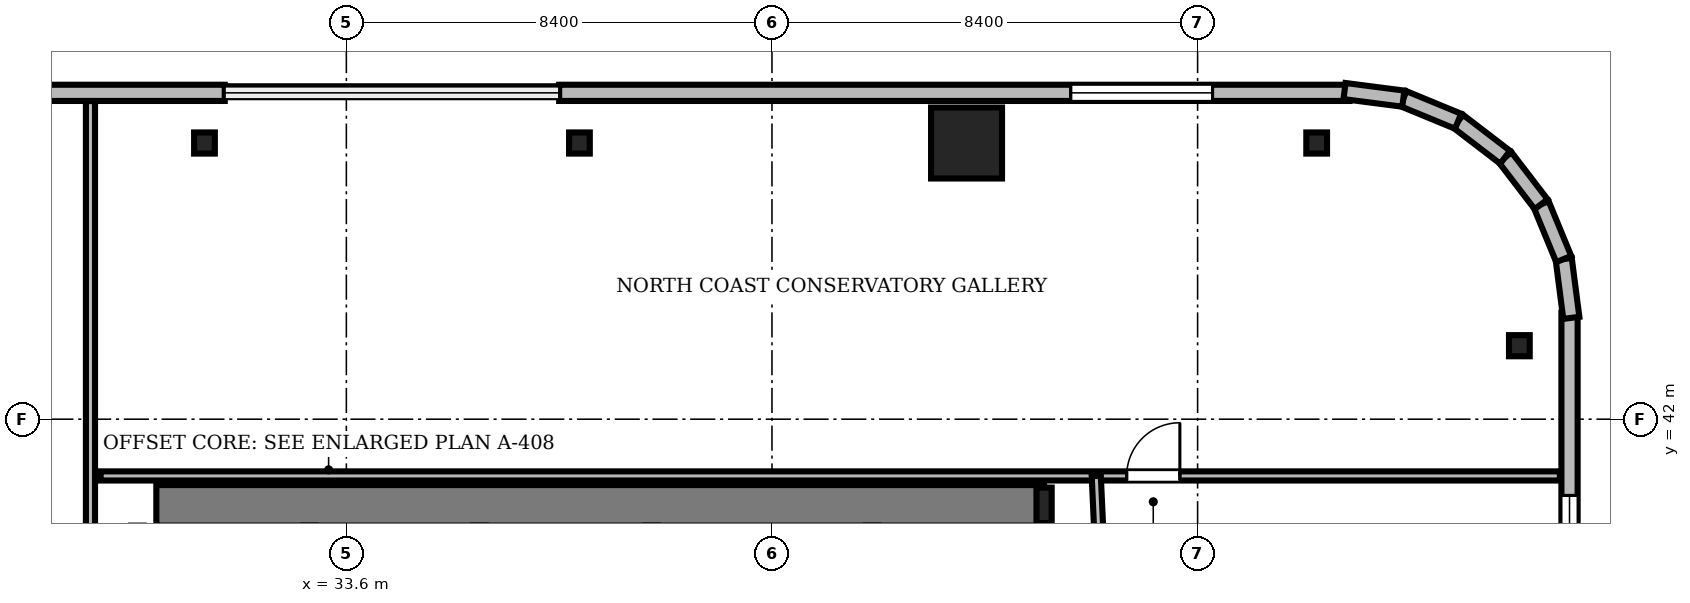
"""IFC4 building model, lengths in metres.
Left out: names, types, materials, properties, quantities, classifications, styles, units other than length and angle.
Written with IfcOpenShell. Run it as: python <this file> out.ifc"""

import sys

from ifc_helpers import new_model, si_unit, direction, frame, frame_2d, origin, origin_2d, place, context, subcontext, project, spatial, rectangle, i_section, extrude, source, transform, mapped, element, fill, save


model = new_model("IFC4")
c1 = context("Model", 3, precision=1e-05, world=origin(), true_north=direction((0.0, 1.0)))
c2 = subcontext(c1, "Body", "Model", "MODEL_VIEW")
j1 = project(units=[si_unit("LENGTHUNIT", "METRE"), si_unit("PLANEANGLEUNIT", "RADIAN")], contexts=[c1])
p1 = place(None, origin())
s1 = spatial("IfcSite", under=j1, at=p1, CompositionType="ELEMENT")
p2 = place(p1, origin())
s2 = spatial("IfcBuilding", under=s1, at=p2, CompositionType="ELEMENT")
p3 = place(p2, frame((0.0, 0.0, 172.2)))
s3 = spatial("IfcBuildingStorey", under=s2, at=p3, CompositionType="ELEMENT", Elevation=172.2)
m1 = source(origin(), c2, "Body", "SweptSolid", [
    extrude(rectangle(XDim=17.52, YDim=0.8, at=frame_2d((8.76, 0.0))), origin(), (0.0, 0.0, 1.0), 4.78),
])
p4 = place(p3, frame((29.85, 40.3, 0.0), z_axis=(0.0, 0.0, 1.0), x_axis=(1.0, 0.0, 0.0)))
e1 = element("IfcWall", 1, at=p4, inside=s3, PredefinedType="SHEAR", context=c2, shape_type="MappedRepresentation", body=[
    mapped(m1, transform((0.0, 0.0, 0.0), scale=1.0)),
])
m2 = source(origin(), c2, "Body", "SweptSolid", [
    extrude(i_section(OverallWidth=0.3, OverallDepth=0.7, WebThickness=0.017, FlangeThickness=0.032, FilletRadius=0.027, at=origin_2d()), origin(), (0.0, 0.0, 1.0), 4.78),
])
p5 = place(p3, frame((47.37, 40.3, 0.0), z_axis=(0.0, 0.0, 1.0), x_axis=(1.0, 0.0, 0.0)))
e2 = element("IfcColumn", 2, at=p5, inside=s3, PredefinedType="COLUMN", context=c2, shape_type="MappedRepresentation", body=[
    mapped(m2, transform((0.0, 0.0, 0.0), scale=1.0)),
])
m3 = source(origin(), c2, "Body", "SweptSolid", [
    extrude(rectangle(XDim=1.4, YDim=1.4, at=origin_2d()), origin(), (0.0, 0.0, 1.0), 4.78),
])
p6 = place(p3, frame((45.84, 47.45, 0.0), z_axis=(0.0, 0.0, 1.0), x_axis=(1.0, 0.0, 0.0)))
e3 = element("IfcColumn", 3, at=p6, inside=s3, PredefinedType="COLUMN", context=c2, shape_type="MappedRepresentation", body=[
    mapped(m3, transform((0.0, 0.0, 0.0), scale=1.0)),
])
m4 = source(origin(), c2, "Body", "SweptSolid", [
    extrude(i_section(OverallWidth=0.409, OverallDepth=0.417, WebThickness=0.021, FlangeThickness=0.033, FilletRadius=0.015, at=origin_2d()), origin(), (0.0, 0.0, 1.0), 4.78),
])
for number, where, z_axis, x_axis in (
    (4, (56.75, 43.45, 0.0), (0.0, 0.0, 1.0), (1.0, 0.0, 0.0)),
    (5, (52.75, 47.45, 0.0), (0.0, 0.0, 1.0), (1.0, 0.0, 0.0)),
    (6, (38.2, 47.45, 0.0), (0.0, 0.0, 1.0), (1.0, 0.0, 0.0)),
    (7, (30.8, 47.45, 0.0), (0.0, 0.0, 1.0), (1.0, 0.0, 0.0)),
):
    element("IfcColumn", number, at=place(p3, frame(where, z_axis=z_axis, x_axis=x_axis)), inside=s3, PredefinedType="COLUMN", context=c2, shape_type="MappedRepresentation", body=[
        mapped(m4, transform((0.0, 0.0, 0.0), scale=1.0)),
    ])
m5 = source(origin(), c2, "Body", "SweptSolid", [
    extrude(rectangle(XDim=15.6, YDim=0.32, at=frame_2d((7.8, 0.0))), origin(), (0.0, 0.0, 1.0), 4.78),
])
p7 = place(p3, frame((53.4, 48.44, 0.0), z_axis=(0.0, 0.0, 1.0), x_axis=(-1.0, 0.0, 0.0)))
e8 = element("IfcWall", 8, at=p7, inside=s3, PredefinedType="SOLIDWALL", context=c2, shape_type="MappedRepresentation", body=[
    mapped(m5, transform((0.0, 0.0, 0.0), scale=1.0)),
])
m6 = source(origin(), c2, "Body", "SweptSolid", [
    extrude(rectangle(XDim=2.8, YDim=2.4, at=frame_2d((1.4, 1.2))), frame((0.0, 0.17, 0.0), z_axis=(0.0, -1.0, 0.0), x_axis=(1.0, 0.0, 0.0)), (0.0, 0.0, 1.0), 0.34),
])
p8 = place(p7, frame((2.705, 0.0, 0.72)))
e9 = element("IfcOpeningElement", 9, at=p8, cuts=e8, PredefinedType="OPENING", context=c2, shape_type="MappedRepresentation", body=[
    mapped(m6, transform((0.0, 0.0, 0.0), scale=1.0)),
])
p9 = place(p3, frame((31.2, 48.44, 0.0), z_axis=(0.0, 0.0, 1.0), x_axis=(-1.0, 0.0, 0.0)))
e10 = element("IfcWall", 10, at=p9, inside=s3, PredefinedType="SOLIDWALL", context=c2, shape_type="MappedRepresentation", body=[
    mapped(m5, transform((0.0, 0.0, 0.0), scale=1.0)),
])
m7 = source(origin(), c2, "Body", "SweptSolid", [
    extrude(rectangle(XDim=1.4, YDim=2.3, at=frame_2d((0.7, 1.15))), frame((0.0, 0.17, 0.0), z_axis=(0.0, -1.0, 0.0), x_axis=(1.0, 0.0, 0.0)), (0.0, 0.0, 1.0), 0.34),
])
p10 = place(p9, frame((5.54, 0.0, 0.0)))
e11 = element("IfcOpeningElement", 11, at=p10, cuts=e10, PredefinedType="OPENING", context=c2, shape_type="MappedRepresentation", body=[
    mapped(m7, transform((0.0, 0.0, 0.0), scale=1.0)),
])
p11 = place(p9, frame((10.095, 0.0, 0.72)))
e12 = element("IfcOpeningElement", 12, at=p11, cuts=e10, PredefinedType="OPENING", context=c2, shape_type="MappedRepresentation", body=[
    mapped(m6, transform((0.0, 0.0, 0.0), scale=1.0)),
])
m8 = source(origin(), c2, "Body", "SweptSolid", [
    extrude(rectangle(XDim=15.6, YDim=0.32, at=frame_2d((7.8, 0.0))), origin(), (0.0, 0.0, 1.0), 4.78),
])
p12 = place(p3, frame((57.74, 28.5, 0.0), z_axis=(0.0, 0.0, 1.0), x_axis=(0.0, 1.0, 0.0)))
e13 = element("IfcWall", 13, at=p12, inside=s3, PredefinedType="SOLIDWALL", context=c2, shape_type="MappedRepresentation", body=[
    mapped(m8, transform((0.0, 0.0, 0.0), scale=1.0)),
])
p13 = place(p12, frame((9.195, 0.0, 0.72)))
e14 = element("IfcOpeningElement", 14, at=p13, cuts=e13, PredefinedType="OPENING", context=c2, shape_type="MappedRepresentation", body=[
    mapped(m6, transform((0.0, 0.0, 0.0), scale=1.0)),
])
m9 = source(origin(), c2, "Body", "SweptSolid", [
    extrude(rectangle(XDim=1.17, YDim=0.32, at=frame_2d((0.585, 0.0))), origin(), (0.0, 0.0, 1.0), 4.78),
])
p14 = place(p3, frame((57.776, 44.0, 0.0), z_axis=(0.0, 0.0, 1.0), x_axis=(-0.128295670475, 0.991735963317, 0.0)))
e15 = element("IfcWall", 15, at=p14, inside=s3, PredefinedType="SOLIDWALL", context=c2, shape_type="MappedRepresentation", body=[
    mapped(m9, transform((0.0, 0.0, 0.0), scale=1.0)),
])
m10 = source(origin(), c2, "Body", "SweptSolid", [
    extrude(rectangle(XDim=1.169, YDim=0.32, at=frame_2d((0.584, 0.0))), origin(), (0.0, 0.0, 1.0), 4.78),
])
p15 = place(p3, frame((57.625, 45.16, 0.0), z_axis=(0.0, 0.0, 1.0), x_axis=(-0.381054331552, 0.924552646638, 0.0)))
e16 = element("IfcWall", 16, at=p15, inside=s3, PredefinedType="SOLIDWALL", context=c2, shape_type="MappedRepresentation", body=[
    mapped(m10, transform((0.0, 0.0, 0.0), scale=1.0)),
])
m11 = source(origin(), c2, "Body", "SweptSolid", [
    extrude(rectangle(XDim=1.169, YDim=0.32, at=frame_2d((0.584, 0.0))), origin(), (0.0, 0.0, 1.0), 4.78),
])
p16 = place(p3, frame((57.18, 46.241, 0.0), z_axis=(0.0, 0.0, 1.0), x_axis=(-0.608387696831, 0.793639975269, 0.0)))
e17 = element("IfcWall", 17, at=p16, inside=s3, PredefinedType="SOLIDWALL", context=c2, shape_type="MappedRepresentation", body=[
    mapped(m11, transform((0.0, 0.0, 0.0), scale=1.0)),
])
m12 = source(origin(), c2, "Body", "SweptSolid", [
    extrude(rectangle(XDim=1.169, YDim=0.32, at=frame_2d((0.584, 0.0))), origin(), (0.0, 0.0, 1.0), 4.78),
])
p17 = place(p3, frame((56.469, 47.169, 0.0), z_axis=(0.0, 0.0, 1.0), x_axis=(-0.793663520347, 0.608356981114, 0.0)))
e18 = element("IfcWall", 18, at=p17, inside=s3, PredefinedType="SOLIDWALL", context=c2, shape_type="MappedRepresentation", body=[
    mapped(m12, transform((0.0, 0.0, 0.0), scale=1.0)),
])
p18 = place(p3, frame((55.541, 47.88, 0.0), z_axis=(0.0, 0.0, 1.0), x_axis=(-0.924552646638, 0.381054331552, 0.0)))
e19 = element("IfcWall", 19, at=p18, inside=s3, PredefinedType="SOLIDWALL", context=c2, shape_type="MappedRepresentation", body=[
    mapped(m10, transform((0.0, 0.0, 0.0), scale=1.0)),
])
p19 = place(p3, frame((54.46, 48.325, 0.0), z_axis=(0.0, 0.0, 1.0), x_axis=(-0.991735963317, 0.128295670475, 0.0)))
e20 = element("IfcWall", 20, at=p19, inside=s3, PredefinedType="SOLIDWALL", context=c2, shape_type="MappedRepresentation", body=[
    mapped(m9, transform((0.0, 0.0, 0.0), scale=1.0)),
])
m13 = source(origin(), c2, "Body", "SweptSolid", [
    extrude(rectangle(XDim=28.8, YDim=0.18, at=frame_2d((14.4, 0.0))), origin(), (0.0, 0.0, 1.0), 4.022),
])
p20 = place(p3, frame((28.75, 40.88, 0.0), z_axis=(0.0, 0.0, 1.0), x_axis=(1.0, 0.0, 0.0)))
e21 = element("IfcWall", 21, at=p20, inside=s3, PredefinedType="PARTITIONING", context=c2, shape_type="MappedRepresentation", body=[
    mapped(m13, transform((0.0, 0.0, 0.0), scale=1.0)),
])
m14 = source(origin(), c2, "Body", "SweptSolid", [
    extrude(rectangle(XDim=1.05, YDim=2.2, at=frame_2d((0.525, 1.1))), frame((0.0, 0.1, 0.0), z_axis=(0.0, -1.0, 0.0), x_axis=(1.0, 0.0, 0.0)), (0.0, 0.0, 1.0), 0.2),
])
p21 = place(p20, frame((20.25, 0.0, 0.0)))
e22 = element("IfcOpeningElement", 22, at=p21, cuts=e21, PredefinedType="OPENING", context=c2, shape_type="MappedRepresentation", body=[
    mapped(m14, transform((0.0, 0.0, 0.0), scale=1.0)),
])
m15 = source(origin(), c2, "Body", "SweptSolid", [
    extrude(rectangle(XDim=26.557, YDim=0.18, at=frame_2d((13.278, 0.0))), origin(), (0.0, 0.0, 1.0), 4.222),
])
p22 = place(p3, frame((49.6, 14.35, 0.0), z_axis=(0.0, 0.0, 1.0), x_axis=(-0.045193318299, 0.998978260014, 0.0)))
e23 = element("IfcWall", 23, at=p22, inside=s3, PredefinedType="PARTITIONING", context=c2, shape_type="MappedRepresentation", body=[
    mapped(m15, transform((0.0, 0.0, 0.0), scale=1.0)),
])
m16 = source(origin(), c2, "Body", "SweptSolid", [
    extrude(rectangle(XDim=1.8, YDim=2.4, at=frame_2d((0.9, 1.2))), frame((0.0, 0.1, 0.0), z_axis=(0.0, -1.0, 0.0), x_axis=(1.0, 0.0, 0.0)), (0.0, 0.0, 1.0), 0.2),
])
p23 = place(p22, frame((2.4, 0.0, 0.0)))
e24 = element("IfcOpeningElement", 24, at=p23, cuts=e23, PredefinedType="OPENING", context=c2, shape_type="MappedRepresentation", body=[
    mapped(m16, transform((0.0, 0.0, 0.0), scale=1.0)),
])
p24 = place(p22, frame((19.2, 0.0, 0.0)))
e25 = element("IfcOpeningElement", 25, at=p24, cuts=e23, PredefinedType="OPENING", context=c2, shape_type="MappedRepresentation", body=[
    mapped(m14, transform((0.0, 0.0, 0.0), scale=1.0)),
])
m17 = source(origin(), c2, "Body", "SweptSolid", [
    extrude(rectangle(XDim=11.278, YDim=0.18, at=frame_2d((5.639, 0.0))), origin(), (0.0, 0.0, 1.0), 4.022),
])
p25 = place(p3, frame((28.55, 37.0, 0.0), z_axis=(0.0, 0.0, 1.0), x_axis=(0.0, 1.0, 0.0)))
e26 = element("IfcWall", 26, at=p25, inside=s3, PredefinedType="PARTITIONING", context=c2, shape_type="MappedRepresentation", body=[
    mapped(m17, transform((0.0, 0.0, 0.0), scale=1.0)),
])
m18 = source(origin(), c2, "Body", "SweptSolid", [
    extrude(rectangle(XDim=2.8, YDim=2.4, at=frame_2d((1.4, 1.2))), frame((0.0, 0.03, 0.0), z_axis=(0.0, -1.0, 0.0), x_axis=(1.0, 0.0, 0.0)), (0.0, 0.0, 1.0), 0.06),
])
p26 = place(p8, origin())
e27 = element("IfcWindow", 27, at=p26, inside=s3, PartitioningType="SINGLE_PANEL", PredefinedType="WINDOW", context=c2, shape_type="MappedRepresentation", body=[
    mapped(m18, transform((0.0, 0.0, 0.0), scale=1.0)),
])
fill(e9, e27)
p27 = place(p13, origin())
e28 = element("IfcWindow", 28, at=p27, inside=s3, PartitioningType="SINGLE_PANEL", PredefinedType="WINDOW", context=c2, shape_type="MappedRepresentation", body=[
    mapped(m18, transform((0.0, 0.0, 0.0), scale=1.0)),
])
fill(e14, e28)
m19 = source(origin(), c2, "Body", "SweptSolid", [
    extrude(rectangle(XDim=1.05, YDim=2.2, at=frame_2d((0.525, 1.1))), frame((0.0, 0.025, 0.0), z_axis=(0.0, -1.0, 0.0), x_axis=(1.0, 0.0, 0.0)), (0.0, 0.0, 1.0), 0.05),
])
p28 = place(p21, origin())
e29 = element("IfcDoor", 29, at=p28, inside=s3, OperationType="SINGLE_SWING_RIGHT", PredefinedType="DOOR", context=c2, shape_type="MappedRepresentation", body=[
    mapped(m19, transform((0.0, 0.0, 0.0), scale=1.0)),
])
fill(e22, e29)
save(model, sys.argv[1])
